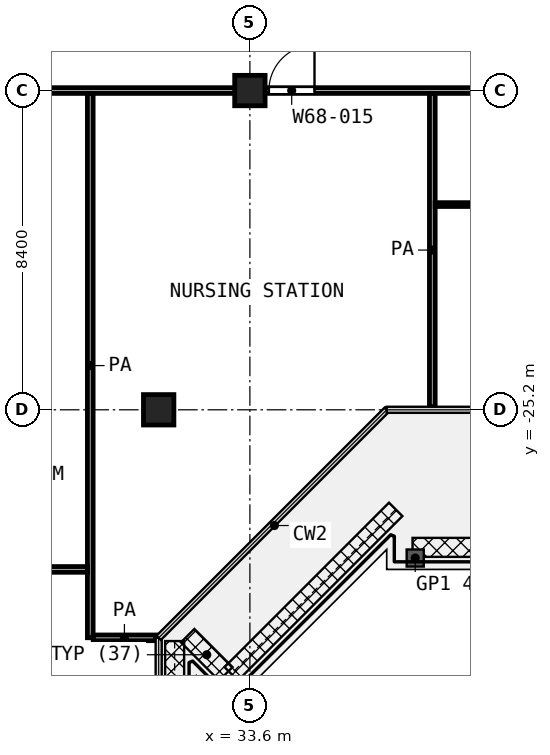
"""IFC4 building model, lengths in metres.
Left out: names, types, materials, properties, quantities, classifications, styles, units other than length and angle.
Written with IfcOpenShell. Run it as: python <this file> out.ifc"""

import sys

from ifc_helpers import new_model, si_unit, direction, frame, frame_2d, origin, origin_2d, place, context, subcontext, project, spatial, rectangle, extrude, element, fill, save


model = new_model("IFC4")
c1 = context("Model", 3, precision=1e-05, world=origin(), true_north=direction((0.0, 1.0)))
c2 = subcontext(c1, "Body", "Model", "MODEL_VIEW")
j1 = project(units=[si_unit("LENGTHUNIT", "METRE"), si_unit("PLANEANGLEUNIT", "RADIAN")], contexts=[c1])
p1 = place(None, origin())
s1 = spatial("IfcSite", under=j1, at=p1, CompositionType="ELEMENT")
p2 = place(p1, origin())
s2 = spatial("IfcBuilding", under=s1, at=p2, CompositionType="ELEMENT")
p3 = place(p2, frame((0.0, 0.0, 315.4)))
s3 = spatial("IfcBuildingStorey", under=s2, at=p3, CompositionType="ELEMENT", Elevation=315.4)
for number, where, z_axis, x_axis in (
    (1, (33.6, -16.8, 0.0), (0.0, 0.0, 1.0), (1.0, 0.0, 0.0)),
    (2, (31.2, -25.2, 0.0), (0.0, 0.0, 1.0), (1.0, 0.0, 0.0)),
):
    element("IfcColumn", number, at=place(p3, frame(where, z_axis=z_axis, x_axis=x_axis)), inside=s3, PredefinedType="COLUMN", context=c2, shape_type="SweptSolid", body=[
        extrude(rectangle(XDim=0.8, YDim=0.8, at=origin_2d()), origin(), (0.0, 0.0, 1.0), 4.2),
    ])
p4 = place(p3, frame((38.475, -19.8, 0.0), z_axis=(0.0, 0.0, 1.0), x_axis=(1.0, 0.0, 0.0)))
e3 = element("IfcWall", 3, at=p4, inside=s3, PredefinedType="PARTITIONING", context=c2, shape_type="SweptSolid", body=[
    extrude(rectangle(XDim=5.275, YDim=0.1, at=frame_2d((2.637, 0.0))), origin(), (0.0, 0.0, 1.0), 3.6),
])
p5 = place(p4, frame((1.525, 0.0, 0.0)))
e4 = element("IfcOpeningElement", 4, at=p5, cuts=e3, PredefinedType="OPENING", context=c2, shape_type="SweptSolid", body=[
    extrude(rectangle(XDim=1.0, YDim=2.1, at=frame_2d((0.5, 1.05))), frame((0.0, 0.06, 0.0), z_axis=(0.0, -1.0, 0.0), x_axis=(1.0, 0.0, 0.0)), (0.0, 0.0, 1.0), 0.12),
])
p6 = place(p3, frame((29.477, -31.2, 0.0), z_axis=(0.0, 0.0, 1.0), x_axis=(1.0, 0.0, 0.0)))
e5 = element("IfcWall", 5, at=p6, inside=s3, PredefinedType="PARTITIONING", context=c2, shape_type="SweptSolid", body=[
    extrude(rectangle(XDim=1.643, YDim=0.15, at=frame_2d((0.822, 0.0))), origin(), (0.0, 0.0, 1.0), 3.6),
])
p7 = place(p3, frame((16.875, -29.4, 0.0), z_axis=(0.0, 0.0, 1.0), x_axis=(1.0, 0.0, 0.0)))
e6 = element("IfcWall", 6, at=p7, inside=s3, PredefinedType="PARTITIONING", context=c2, shape_type="SweptSolid", body=[
    extrude(rectangle(XDim=12.45, YDim=0.15, at=frame_2d((6.225, 0.0))), origin(), (0.0, 0.0, 1.0), 3.6),
])
p8 = place(p3, frame((24.7, -16.8, 0.0), z_axis=(0.0, 0.0, 1.0), x_axis=(1.0, 0.0, 0.0)))
e7 = element("IfcWall", 7, at=p8, inside=s3, PredefinedType="PARTITIONING", context=c2, shape_type="SweptSolid", body=[
    extrude(rectangle(XDim=34.02, YDim=0.15, at=frame_2d((17.01, 0.0))), origin(), (0.0, 0.0, 1.0), 3.6),
])
p9 = place(p8, frame((1.85, 0.0, 0.0)))
e8 = element("IfcOpeningElement", 8, at=p9, cuts=e7, PredefinedType="OPENING", context=c2, shape_type="SweptSolid", body=[
    extrude(rectangle(XDim=1.5, YDim=2.1, at=frame_2d((0.75, 1.05))), frame((0.0, 0.085, 0.0), z_axis=(0.0, -1.0, 0.0), x_axis=(1.0, 0.0, 0.0)), (0.0, 0.0, 1.0), 0.17),
])
p10 = place(p8, frame((9.4, 0.0, 0.0)))
e9 = element("IfcOpeningElement", 9, at=p10, cuts=e7, PredefinedType="OPENING", context=c2, shape_type="SweptSolid", body=[
    extrude(rectangle(XDim=1.2, YDim=2.1, at=frame_2d((0.6, 1.05))), frame((0.0, 0.085, 0.0), z_axis=(0.0, -1.0, 0.0), x_axis=(1.0, 0.0, 0.0)), (0.0, 0.0, 1.0), 0.17),
])
p11 = place(p8, frame((19.8, 0.0, 0.0)))
e10 = element("IfcOpeningElement", 10, at=p11, cuts=e7, PredefinedType="OPENING", context=c2, shape_type="SweptSolid", body=[
    extrude(rectangle(XDim=1.2, YDim=2.1, at=frame_2d((0.6, 1.05))), frame((0.0, 0.085, 0.0), z_axis=(0.0, -1.0, 0.0), x_axis=(1.0, 0.0, 0.0)), (0.0, 0.0, 1.0), 0.17),
])
p12 = place(p8, frame((18.28, 0.0, 0.0)))
e11 = element("IfcOpeningElement", 11, at=p12, cuts=e7, PredefinedType="OPENING", context=c2, shape_type="SweptSolid", body=[
    extrude(rectangle(XDim=1.2, YDim=2.1, at=frame_2d((0.6, 1.05))), frame((0.0, 0.085, 0.0), z_axis=(0.0, -1.0, 0.0), x_axis=(1.0, 0.0, 0.0)), (0.0, 0.0, 1.0), 0.17),
])
p13 = place(p8, frame((24.0, 0.0, 0.0)))
e12 = element("IfcOpeningElement", 12, at=p13, cuts=e7, PredefinedType="OPENING", context=c2, shape_type="SweptSolid", body=[
    extrude(rectangle(XDim=1.2, YDim=2.1, at=frame_2d((0.6, 1.05))), frame((0.0, 0.085, 0.0), z_axis=(0.0, -1.0, 0.0), x_axis=(1.0, 0.0, 0.0)), (0.0, 0.0, 1.0), 0.17),
])
p14 = place(p8, frame((27.45, 0.0, 0.0)))
e13 = element("IfcOpeningElement", 13, at=p14, cuts=e7, PredefinedType="OPENING", context=c2, shape_type="SweptSolid", body=[
    extrude(rectangle(XDim=1.0, YDim=2.1, at=frame_2d((0.5, 1.05))), frame((0.0, 0.085, 0.0), z_axis=(0.0, -1.0, 0.0), x_axis=(1.0, 0.0, 0.0)), (0.0, 0.0, 1.0), 0.17),
])
p15 = place(p8, frame((31.65, 0.0, 0.0)))
e14 = element("IfcOpeningElement", 14, at=p15, cuts=e7, PredefinedType="OPENING", context=c2, shape_type="SweptSolid", body=[
    extrude(rectangle(XDim=1.0, YDim=2.1, at=frame_2d((0.5, 1.05))), frame((0.0, 0.085, 0.0), z_axis=(0.0, -1.0, 0.0), x_axis=(1.0, 0.0, 0.0)), (0.0, 0.0, 1.0), 0.17),
])
p16 = place(p3, frame((29.4, -31.198, 0.0), z_axis=(0.0, 0.0, 1.0), x_axis=(0.0, 1.0, 0.0)))
e15 = element("IfcWall", 15, at=p16, inside=s3, PredefinedType="PARTITIONING", context=c2, shape_type="SweptSolid", body=[
    extrude(rectangle(XDim=14.323, YDim=0.15, at=frame_2d((7.162, 0.0))), origin(), (0.0, 0.0, 1.0), 3.6),
])
p17 = place(p3, frame((38.4, -25.12, 0.0), z_axis=(0.0, 0.0, 1.0), x_axis=(0.0, 1.0, 0.0)))
e16 = element("IfcWall", 16, at=p17, inside=s3, PredefinedType="PARTITIONING", context=c2, shape_type="SweptSolid", body=[
    extrude(rectangle(XDim=8.245, YDim=0.15, at=frame_2d((4.123, 0.0))), origin(), (0.0, 0.0, 1.0), 3.6),
])
p18 = place(p10, origin())
e17 = element("IfcDoor", 17, at=p18, inside=s3, OperationType="SINGLE_SWING_RIGHT", PredefinedType="DOOR", context=c2, shape_type="SweptSolid", body=[
    extrude(rectangle(XDim=1.2, YDim=2.1, at=frame_2d((0.6, 1.05))), frame((0.0, 0.025, 0.0), z_axis=(0.0, -1.0, 0.0), x_axis=(1.0, 0.0, 0.0)), (0.0, 0.0, 1.0), 0.05),
])
fill(e9, e17)
save(model, sys.argv[1])
